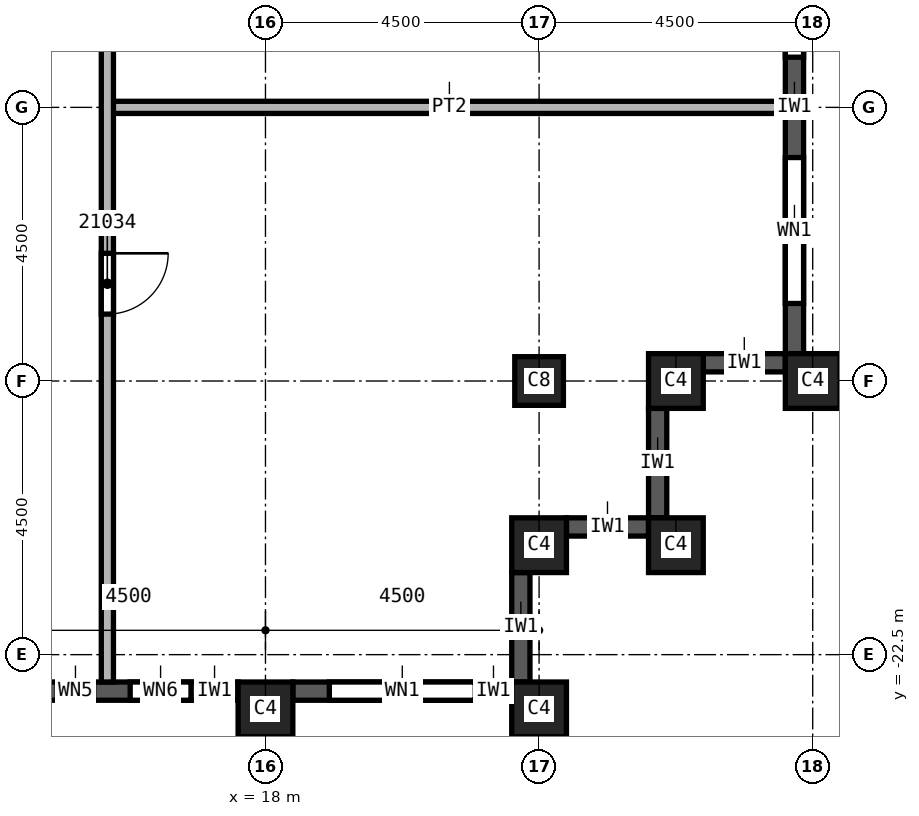
"""IFC4 building model, lengths in metres.
Left out: names, types, materials, properties, quantities, classifications, styles, units other than length and angle.
Written with IfcOpenShell. Run it as: python <this file> out.ifc"""

import sys

from ifc_helpers import new_model, si_unit, direction, frame, frame_2d, origin, origin_2d, place, context, subcontext, project, spatial, rectangle, extrude, element, fill, save


model = new_model("IFC4")
c1 = context("Model", 3, precision=1e-05, world=origin(), true_north=direction((0.0, 1.0)))
c2 = subcontext(c1, "Body", "Model", "MODEL_VIEW")
j1 = project(units=[si_unit("LENGTHUNIT", "METRE"), si_unit("PLANEANGLEUNIT", "RADIAN")], contexts=[c1])
p1 = place(None, origin())
s1 = spatial("IfcSite", under=j1, at=p1, CompositionType="ELEMENT")
p2 = place(p1, origin())
s2 = spatial("IfcBuilding", under=s1, at=p2, CompositionType="ELEMENT")
p3 = place(p2, frame((0.0, 0.0, 304.0)))
s3 = spatial("IfcBuildingStorey", under=s2, at=p3, CompositionType="ELEMENT", Elevation=304.0)
p4 = place(p3, frame((22.5, -18.0, 0.0), z_axis=(0.0, 0.0, 1.0), x_axis=(1.0, 0.0, 0.0)))
e1 = element("IfcColumn", 1, at=p4, inside=s3, PredefinedType="COLUMN", context=c2, shape_type="SweptSolid", body=[
    extrude(rectangle(XDim=0.8, YDim=0.8, at=origin_2d()), origin(), (0.0, 0.0, 1.0), 3.74),
])
for number, where, z_axis, x_axis in (
    (2, (27.0, -18.0, 0.0), (0.0, 0.0, 1.0), (0.0, 1.0, 0.0)),
    (3, (18.0, -23.4, 0.0), (0.0, 0.0, 1.0), (1.0, 0.0, 0.0)),
    (4, (22.5, -23.4, 0.0), (0.0, 0.0, 1.0), (1.0, 0.0, 0.0)),
    (5, (22.5, -20.7, 0.0), (0.0, 0.0, 1.0), (1.0, 0.0, 0.0)),
    (6, (24.75, -20.7, 0.0), (0.0, 0.0, 1.0), (1.0, 0.0, 0.0)),
    (7, (24.75, -18.0, 0.0), (0.0, 0.0, 1.0), (1.0, 0.0, 0.0)),
):
    element("IfcColumn", number, at=place(p3, frame(where, z_axis=z_axis, x_axis=x_axis)), inside=s3, PredefinedType="COLUMN", context=c2, shape_type="SweptSolid", body=[
        extrude(rectangle(XDim=0.9, YDim=0.9, at=origin_2d()), origin(), (0.0, 0.0, 1.0), 3.74),
    ])
p5 = place(p3, frame((13.95, -23.1, 0.0), z_axis=(0.0, 0.0, 1.0), x_axis=(1.0, 0.0, 0.0)))
e8 = element("IfcWall", 8, at=p5, inside=s3, PredefinedType="SOLIDWALL", context=c2, shape_type="SweptSolid", body=[
    extrude(rectangle(XDim=3.6, YDim=0.3, at=frame_2d((1.8, 0.0))), origin(), (0.0, 0.0, 1.0), 3.14),
])
p6 = place(p5, frame((0.625, 0.0, 0.8)))
e9 = element("IfcOpeningElement", 9, at=p6, cuts=e8, PredefinedType="OPENING", context=c2, shape_type="SweptSolid", body=[
    extrude(rectangle(XDim=0.6, YDim=1.95, at=frame_2d((0.3, 0.975))), frame((0.0, 0.15, 0.0), z_axis=(0.0, -1.0, 0.0), x_axis=(1.0, 0.0, 0.0)), (0.0, 0.0, 1.0), 0.3),
])
p7 = place(p5, frame((1.825, 0.0, 0.8)))
e10 = element("IfcOpeningElement", 10, at=p7, cuts=e8, PredefinedType="OPENING", context=c2, shape_type="SweptSolid", body=[
    extrude(rectangle(XDim=1.0, YDim=1.95, at=frame_2d((0.5, 0.975))), frame((0.0, 0.15, 0.0), z_axis=(0.0, -1.0, 0.0), x_axis=(1.0, 0.0, 0.0)), (0.0, 0.0, 1.0), 0.3),
])
p8 = place(p3, frame((18.45, -23.1, 0.0), z_axis=(0.0, 0.0, 1.0), x_axis=(1.0, 0.0, 0.0)))
e11 = element("IfcWall", 11, at=p8, inside=s3, PredefinedType="SOLIDWALL", context=c2, shape_type="SweptSolid", body=[
    extrude(rectangle(XDim=3.6, YDim=0.3, at=frame_2d((1.8, 0.0))), origin(), (0.0, 0.0, 1.0), 3.14),
])
p9 = place(p8, frame((0.6, 0.0, 0.8)))
e12 = element("IfcOpeningElement", 12, at=p9, cuts=e11, PredefinedType="OPENING", context=c2, shape_type="SweptSolid", body=[
    extrude(rectangle(XDim=2.4, YDim=1.95, at=frame_2d((1.2, 0.975))), frame((0.0, 0.15, 0.0), z_axis=(0.0, -1.0, 0.0), x_axis=(1.0, 0.0, 0.0)), (0.0, 0.0, 1.0), 0.3),
])
p10 = place(p3, frame((22.2, -22.95, 0.0), z_axis=(0.0, 0.0, 1.0), x_axis=(0.0, 1.0, 0.0)))
e13 = element("IfcWall", 13, at=p10, inside=s3, PredefinedType="SOLIDWALL", context=c2, shape_type="SweptSolid", body=[
    extrude(rectangle(XDim=1.8, YDim=0.3, at=frame_2d((0.9, 0.0))), origin(), (0.0, 0.0, 1.0), 3.14),
])
p11 = place(p3, frame((22.95, -20.4, 0.0), z_axis=(0.0, 0.0, 1.0), x_axis=(1.0, 0.0, 0.0)))
e14 = element("IfcWall", 14, at=p11, inside=s3, PredefinedType="SOLIDWALL", context=c2, shape_type="SweptSolid", body=[
    extrude(rectangle(XDim=1.35, YDim=0.3, at=frame_2d((0.675, 0.0))), origin(), (0.0, 0.0, 1.0), 3.14),
])
p12 = place(p3, frame((24.45, -20.25, 0.0), z_axis=(0.0, 0.0, 1.0), x_axis=(0.0, 1.0, 0.0)))
e15 = element("IfcWall", 15, at=p12, inside=s3, PredefinedType="SOLIDWALL", context=c2, shape_type="SweptSolid", body=[
    extrude(rectangle(XDim=1.8, YDim=0.3, at=frame_2d((0.9, 0.0))), origin(), (0.0, 0.0, 1.0), 3.14),
])
p13 = place(p3, frame((25.2, -17.7, 0.0), z_axis=(0.0, 0.0, 1.0), x_axis=(1.0, 0.0, 0.0)))
e16 = element("IfcWall", 16, at=p13, inside=s3, PredefinedType="SOLIDWALL", context=c2, shape_type="SweptSolid", body=[
    extrude(rectangle(XDim=1.35, YDim=0.3, at=frame_2d((0.675, 0.0))), origin(), (0.0, 0.0, 1.0), 3.14),
])
p14 = place(p3, frame((26.7, -17.55, 0.0), z_axis=(0.0, 0.0, 1.0), x_axis=(0.0, 1.0, 0.0)))
e17 = element("IfcWall", 17, at=p14, inside=s3, PredefinedType="SOLIDWALL", context=c2, shape_type="SweptSolid", body=[
    extrude(rectangle(XDim=8.1, YDim=0.3, at=frame_2d((4.05, 0.0))), origin(), (0.0, 0.0, 1.0), 3.14),
])
p15 = place(p14, frame((0.825, 0.0, 0.8)))
e18 = element("IfcOpeningElement", 18, at=p15, cuts=e17, PredefinedType="OPENING", context=c2, shape_type="SweptSolid", body=[
    extrude(rectangle(XDim=2.4, YDim=1.95, at=frame_2d((1.2, 0.975))), frame((0.0, 0.15, 0.0), z_axis=(0.0, -1.0, 0.0), x_axis=(1.0, 0.0, 0.0)), (0.0, 0.0, 1.0), 0.3),
])
p16 = place(p14, frame((4.875, 0.0, 0.8)))
e19 = element("IfcOpeningElement", 19, at=p16, cuts=e17, PredefinedType="OPENING", context=c2, shape_type="SweptSolid", body=[
    extrude(rectangle(XDim=2.4, YDim=1.95, at=frame_2d((1.2, 0.975))), frame((0.0, 0.15, 0.0), z_axis=(0.0, -1.0, 0.0), x_axis=(1.0, 0.0, 0.0)), (0.0, 0.0, 1.0), 0.3),
])
p17 = place(p3, frame((15.4, -13.5, 0.0), z_axis=(0.0, 0.0, 1.0), x_axis=(1.0, 0.0, 0.0)))
e20 = element("IfcWall", 20, at=p17, inside=s3, PredefinedType="PARTITIONING", context=c2, shape_type="SweptSolid", body=[
    extrude(rectangle(XDim=11.15, YDim=0.2, at=frame_2d((5.575, 0.0))), origin(), (0.0, 0.0, 1.0), 3.74),
])
p18 = place(p3, frame((15.4, 22.95, 0.0), z_axis=(0.0, 0.0, 1.0), x_axis=(0.0, -1.0, 0.0)))
e21 = element("IfcWall", 21, at=p18, inside=s3, PredefinedType="PARTITIONING", context=c2, shape_type="SweptSolid", body=[
    extrude(rectangle(XDim=45.9, YDim=0.2, at=frame_2d((22.95, 0.0))), origin(), (0.0, 0.0, 1.0), 3.74),
])
p19 = place(p18, frame((20.7, 0.0, 0.0)))
e22 = element("IfcOpeningElement", 22, at=p19, cuts=e21, PredefinedType="OPENING", context=c2, shape_type="SweptSolid", body=[
    extrude(rectangle(XDim=1.0, YDim=2.1, at=frame_2d((0.5, 1.05))), frame((0.0, 0.1, 0.0), z_axis=(0.0, -1.0, 0.0), x_axis=(1.0, 0.0, 0.0)), (0.0, 0.0, 1.0), 0.2),
])
p20 = place(p18, frame((11.85, 0.0, 0.0)))
e23 = element("IfcOpeningElement", 23, at=p20, cuts=e21, PredefinedType="OPENING", context=c2, shape_type="SweptSolid", body=[
    extrude(rectangle(XDim=1.0, YDim=2.1, at=frame_2d((0.5, 1.05))), frame((0.0, 0.1, 0.0), z_axis=(0.0, -1.0, 0.0), x_axis=(1.0, 0.0, 0.0)), (0.0, 0.0, 1.0), 0.2),
])
p21 = place(p18, frame((4.725, 0.0, 0.0)))
e24 = element("IfcOpeningElement", 24, at=p21, cuts=e21, PredefinedType="OPENING", context=c2, shape_type="SweptSolid", body=[
    extrude(rectangle(XDim=1.0, YDim=2.1, at=frame_2d((0.5, 1.05))), frame((0.0, 0.1, 0.0), z_axis=(0.0, -1.0, 0.0), x_axis=(1.0, 0.0, 0.0)), (0.0, 0.0, 1.0), 0.2),
])
p22 = place(p18, frame((0.4, 0.0, 0.0)))
e25 = element("IfcOpeningElement", 25, at=p22, cuts=e21, PredefinedType="OPENING", context=c2, shape_type="SweptSolid", body=[
    extrude(rectangle(XDim=1.0, YDim=2.1, at=frame_2d((0.5, 1.05))), frame((0.0, 0.1, 0.0), z_axis=(0.0, -1.0, 0.0), x_axis=(1.0, 0.0, 0.0)), (0.0, 0.0, 1.0), 0.2),
])
p23 = place(p18, frame((38.85, 0.0, 0.0)))
e26 = element("IfcOpeningElement", 26, at=p23, cuts=e21, PredefinedType="OPENING", context=c2, shape_type="SweptSolid", body=[
    extrude(rectangle(XDim=1.0, YDim=2.1, at=frame_2d((0.5, 1.05))), frame((0.0, 0.1, 0.0), z_axis=(0.0, -1.0, 0.0), x_axis=(1.0, 0.0, 0.0)), (0.0, 0.0, 1.0), 0.2),
])
p24 = place(p18, frame((26.55, 0.0, 0.0)))
e27 = element("IfcOpeningElement", 27, at=p24, cuts=e21, PredefinedType="OPENING", context=c2, shape_type="SweptSolid", body=[
    extrude(rectangle(XDim=1.0, YDim=2.1, at=frame_2d((0.5, 1.05))), frame((0.0, 0.1, 0.0), z_axis=(0.0, -1.0, 0.0), x_axis=(1.0, 0.0, 0.0)), (0.0, 0.0, 1.0), 0.2),
])
p25 = place(p9, origin())
e28 = element("IfcWindow", 28, at=p25, inside=s3, PartitioningType="SINGLE_PANEL", PredefinedType="WINDOW", context=c2, shape_type="SweptSolid", body=[
    extrude(rectangle(XDim=2.4, YDim=1.95, at=frame_2d((1.2, 0.975))), frame((0.0, 0.03, 0.0), z_axis=(0.0, -1.0, 0.0), x_axis=(1.0, 0.0, 0.0)), (0.0, 0.0, 1.0), 0.06),
])
fill(e12, e28)
p26 = place(p15, origin())
e29 = element("IfcWindow", 29, at=p26, inside=s3, PartitioningType="SINGLE_PANEL", PredefinedType="WINDOW", context=c2, shape_type="SweptSolid", body=[
    extrude(rectangle(XDim=2.4, YDim=1.95, at=frame_2d((1.2, 0.975))), frame((0.0, 0.03, 0.0), z_axis=(0.0, -1.0, 0.0), x_axis=(1.0, 0.0, 0.0)), (0.0, 0.0, 1.0), 0.06),
])
fill(e18, e29)
p27 = place(p16, origin())
e30 = element("IfcWindow", 30, at=p27, inside=s3, PartitioningType="SINGLE_PANEL", PredefinedType="WINDOW", context=c2, shape_type="SweptSolid", body=[
    extrude(rectangle(XDim=2.4, YDim=1.95, at=frame_2d((1.2, 0.975))), frame((0.0, 0.03, 0.0), z_axis=(0.0, -1.0, 0.0), x_axis=(1.0, 0.0, 0.0)), (0.0, 0.0, 1.0), 0.06),
])
fill(e19, e30)
p28 = place(p23, origin())
e31 = element("IfcDoor", 31, at=p28, inside=s3, OperationType="SINGLE_SWING_LEFT", PredefinedType="DOOR", context=c2, shape_type="SweptSolid", body=[
    extrude(rectangle(XDim=1.0, YDim=2.1, at=frame_2d((0.5, 1.05))), frame((0.0, 0.025, 0.0), z_axis=(0.0, -1.0, 0.0), x_axis=(1.0, 0.0, 0.0)), (0.0, 0.0, 1.0), 0.05),
])
fill(e26, e31)
p29 = place(p6, origin())
e32 = element("IfcWindow", 32, at=p29, inside=s3, PartitioningType="SINGLE_PANEL", PredefinedType="WINDOW", context=c2, shape_type="SweptSolid", body=[
    extrude(rectangle(XDim=0.6, YDim=1.95, at=frame_2d((0.3, 0.975))), frame((0.0, 0.03, 0.0), z_axis=(0.0, -1.0, 0.0), x_axis=(1.0, 0.0, 0.0)), (0.0, 0.0, 1.0), 0.06),
])
fill(e9, e32)
p30 = place(p7, origin())
e33 = element("IfcWindow", 33, at=p30, inside=s3, PartitioningType="SINGLE_PANEL", PredefinedType="WINDOW", context=c2, shape_type="SweptSolid", body=[
    extrude(rectangle(XDim=1.0, YDim=1.95, at=frame_2d((0.5, 0.975))), frame((0.0, 0.03, 0.0), z_axis=(0.0, -1.0, 0.0), x_axis=(1.0, 0.0, 0.0)), (0.0, 0.0, 1.0), 0.06),
])
fill(e10, e33)
save(model, sys.argv[1])
